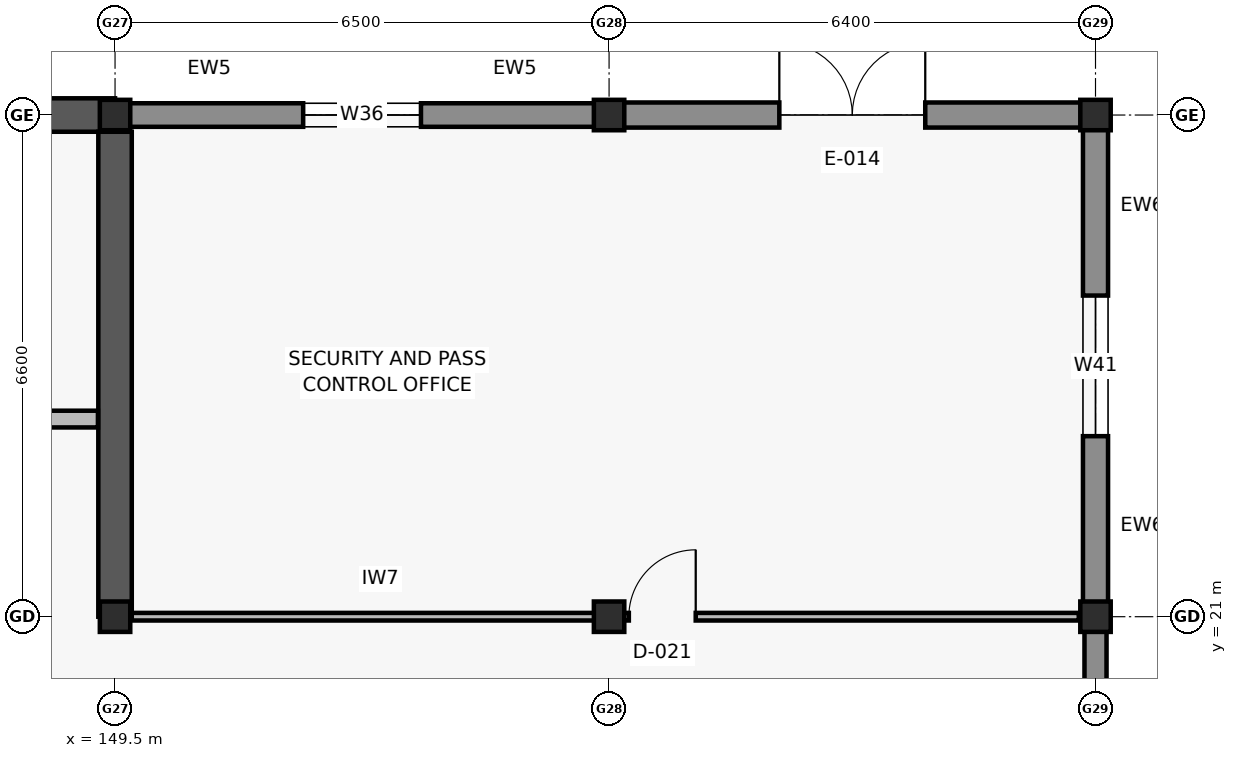
"""IFC4 building model, lengths in metres.
Left out: names, types, materials, properties, quantities, classifications, styles, units other than length and angle.
Written with IfcOpenShell. Run it as: python <this file> out.ifc"""

import sys

from ifc_helpers import new_model, si_unit, direction, frame, frame_2d, origin, origin_2d, place, context, subcontext, project, spatial, rectangle, i_section, extrude, element, fill, save


model = new_model("IFC4")
c1 = context("Model", 3, precision=1e-05, world=origin(), true_north=direction((0.0, 1.0)))
c2 = subcontext(c1, "Body", "Model", "MODEL_VIEW")
j1 = project(units=[si_unit("LENGTHUNIT", "METRE"), si_unit("PLANEANGLEUNIT", "RADIAN")], contexts=[c1])
p1 = place(None, origin())
s1 = spatial("IfcSite", under=j1, at=p1, CompositionType="ELEMENT")
p2 = place(p1, origin())
s2 = spatial("IfcBuilding", under=s1, at=p2, CompositionType="ELEMENT")
p3 = place(p2, origin())
s3 = spatial("IfcBuildingStorey", under=s2, at=p3, CompositionType="ELEMENT", Elevation=0.0)
for number, where, z_axis, x_axis in (
    (1, (149.5, 21.0, 0.0), (0.0, 0.0, 1.0), (1.0, 0.0, 0.0)),
    (2, (149.5, 27.6, 0.0), (0.0, 0.0, 1.0), (1.0, 0.0, 0.0)),
    (3, (156.0, 21.0, 0.0), (0.0, 0.0, 1.0), (1.0, 0.0, 0.0)),
    (4, (156.0, 27.6, 0.0), (0.0, 0.0, 1.0), (1.0, 0.0, 0.0)),
    (5, (162.4, 21.0, 0.0), (0.0, 0.0, 1.0), (1.0, 0.0, 0.0)),
    (6, (162.4, 27.6, 0.0), (0.0, 0.0, 1.0), (1.0, 0.0, 0.0)),
):
    element("IfcColumn", number, at=place(p3, frame(where, z_axis=z_axis, x_axis=x_axis)), inside=s3, PredefinedType="COLUMN", context=c2, shape_type="SweptSolid", body=[
        extrude(i_section(OverallWidth=0.4, OverallDepth=0.4, WebThickness=0.02, FlangeThickness=0.032, at=origin_2d()), origin(), (0.0, 0.0, 1.0), 5.4),
    ])
p4 = place(p3, frame((143.0, 27.6, 0.0), z_axis=(0.0, 0.0, 1.0), x_axis=(1.0, 0.0, 0.0)))
e7 = element("IfcWall", 7, at=p4, inside=s3, PredefinedType="SHEAR", context=c2, shape_type="SweptSolid", body=[
    extrude(rectangle(XDim=6.5, YDim=0.44, at=frame_2d((3.25, 0.0))), origin(), (0.0, 0.0, 1.0), 5.16),
])
p5 = place(p4, frame((1.48, 0.0, 0.0)))
e8 = element("IfcOpeningElement", 8, at=p5, cuts=e7, PredefinedType="OPENING", context=c2, shape_type="SweptSolid", body=[
    extrude(rectangle(XDim=1.06, YDim=2.12, at=frame_2d((0.53, 1.06))), frame((0.0, 0.23, 0.0), z_axis=(0.0, -1.0, 0.0), x_axis=(1.0, 0.0, 0.0)), (0.0, 0.0, 1.0), 0.46),
])
p6 = place(p3, frame((149.5, 21.0, 0.0), z_axis=(0.0, 0.0, 1.0), x_axis=(0.0, 1.0, 0.0)))
e9 = element("IfcWall", 9, at=p6, inside=s3, PredefinedType="SHEAR", context=c2, shape_type="SweptSolid", body=[
    extrude(rectangle(XDim=6.38, YDim=0.44, at=frame_2d((3.19, 0.0))), origin(), (0.0, 0.0, 1.0), 5.16),
])
p7 = place(p3, frame((149.505, 27.6, 0.0), z_axis=(0.0, 0.0, 1.0), x_axis=(1.0, 0.0, 0.0)))
e10 = element("IfcWall", 10, at=p7, inside=s3, PredefinedType="SOLIDWALL", context=c2, shape_type="SweptSolid", body=[
    extrude(rectangle(XDim=6.49, YDim=0.31, at=frame_2d((3.245, 0.0))), origin(), (0.0, 0.0, 1.0), 4.52),
])
p8 = place(p7, frame((2.47, 0.0, 0.8)))
e11 = element("IfcOpeningElement", 11, at=p8, cuts=e10, PredefinedType="OPENING", context=c2, shape_type="SweptSolid", body=[
    extrude(rectangle(XDim=1.55, YDim=1.5, at=frame_2d((0.775, 0.75))), frame((0.0, 0.165, 0.0), z_axis=(0.0, -1.0, 0.0), x_axis=(1.0, 0.0, 0.0)), (0.0, 0.0, 1.0), 0.33),
])
p9 = place(p3, frame((156.005, 27.6, 0.0), z_axis=(0.0, 0.0, 1.0), x_axis=(1.0, 0.0, 0.0)))
e12 = element("IfcWall", 12, at=p9, inside=s3, PredefinedType="SOLIDWALL", context=c2, shape_type="SweptSolid", body=[
    extrude(rectangle(XDim=6.39, YDim=0.33, at=frame_2d((3.195, 0.0))), origin(), (0.0, 0.0, 1.0), 4.52),
])
p10 = place(p9, frame((2.235, 0.0, 0.0)))
e13 = element("IfcOpeningElement", 13, at=p10, cuts=e12, PredefinedType="OPENING", context=c2, shape_type="SweptSolid", body=[
    extrude(rectangle(XDim=1.92, YDim=2.25, at=frame_2d((0.96, 1.125))), frame((0.0, 0.175, 0.0), z_axis=(0.0, -1.0, 0.0), x_axis=(1.0, 0.0, 0.0)), (0.0, 0.0, 1.0), 0.35),
])
p11 = place(p3, frame((162.4, 20.995, 0.0), z_axis=(0.0, 0.0, 1.0), x_axis=(0.0, -1.0, 0.0)))
e14 = element("IfcWall", 14, at=p11, inside=s3, PredefinedType="SOLIDWALL", context=c2, shape_type="SweptSolid", body=[
    extrude(rectangle(XDim=6.59, YDim=0.29, at=frame_2d((3.295, 0.0))), origin(), (0.0, 0.0, 1.0), 4.52),
])
p12 = place(p11, frame((3.978, 0.0, 0.8)))
e15 = element("IfcOpeningElement", 15, at=p12, cuts=e14, PredefinedType="OPENING", context=c2, shape_type="SweptSolid", body=[
    extrude(rectangle(XDim=1.4, YDim=1.65, at=frame_2d((0.7, 0.825))), frame((0.0, 0.155, 0.0), z_axis=(0.0, -1.0, 0.0), x_axis=(1.0, 0.0, 0.0)), (0.0, 0.0, 1.0), 0.31),
])
p13 = place(p3, frame((162.4, 27.595, 0.0), z_axis=(0.0, 0.0, 1.0), x_axis=(0.0, -1.0, 0.0)))
e16 = element("IfcWall", 16, at=p13, inside=s3, PredefinedType="SOLIDWALL", context=c2, shape_type="SweptSolid", body=[
    extrude(rectangle(XDim=6.59, YDim=0.33, at=frame_2d((3.295, 0.0))), origin(), (0.0, 0.0, 1.0), 4.52),
])
p14 = place(p13, frame((2.37, 0.0, 0.8)))
e17 = element("IfcOpeningElement", 17, at=p14, cuts=e16, PredefinedType="OPENING", context=c2, shape_type="SweptSolid", body=[
    extrude(rectangle(XDim=1.85, YDim=1.55, at=frame_2d((0.925, 0.775))), frame((0.0, 0.175, 0.0), z_axis=(0.0, -1.0, 0.0), x_axis=(1.0, 0.0, 0.0)), (0.0, 0.0, 1.0), 0.35),
])
p15 = place(p3, frame((146.24, 23.6, 0.0), z_axis=(0.0, 0.0, 1.0), x_axis=(1.0, 0.0, 0.0)))
e18 = element("IfcWall", 18, at=p15, inside=s3, PredefinedType="SOLIDWALL", context=c2, shape_type="SweptSolid", body=[
    extrude(rectangle(XDim=3.035, YDim=0.22, at=frame_2d((1.518, 0.0))), origin(), (0.0, 0.0, 1.0), 5.16),
])
p16 = place(p15, frame((0.968, 0.0, 0.0)))
e19 = element("IfcOpeningElement", 19, at=p16, cuts=e18, PredefinedType="OPENING", context=c2, shape_type="SweptSolid", body=[
    extrude(rectangle(XDim=1.1, YDim=2.1, at=frame_2d((0.55, 1.05))), frame((0.0, 0.12, 0.0), z_axis=(0.0, -1.0, 0.0), x_axis=(1.0, 0.0, 0.0)), (0.0, 0.0, 1.0), 0.24),
])
p17 = place(p3, frame((149.72, 21.0, 0.0), z_axis=(0.0, 0.0, 1.0), x_axis=(1.0, 0.0, 0.0)))
e20 = element("IfcWall", 20, at=p17, inside=s3, PredefinedType="PARTITIONING", context=c2, shape_type="SweptSolid", body=[
    extrude(rectangle(XDim=12.46, YDim=0.1, at=frame_2d((6.23, 0.0))), origin(), (0.0, 0.0, 1.0), 4.5),
])
p18 = place(p17, frame((6.54, 0.0, 0.0)))
e21 = element("IfcOpeningElement", 21, at=p18, cuts=e20, PredefinedType="OPENING", context=c2, shape_type="SweptSolid", body=[
    extrude(rectangle(XDim=0.88, YDim=2.04, at=frame_2d((0.44, 1.02))), frame((0.0, 0.06, 0.0), z_axis=(0.0, -1.0, 0.0), x_axis=(1.0, 0.0, 0.0)), (0.0, 0.0, 1.0), 0.12),
])
p19 = place(p8, origin())
e22 = element("IfcWindow", 22, at=p19, inside=s3, PartitioningType="SINGLE_PANEL", PredefinedType="WINDOW", context=c2, shape_type="SweptSolid", body=[
    extrude(rectangle(XDim=1.55, YDim=1.5, at=frame_2d((0.775, 0.75))), frame((0.0, 0.03, 0.0), z_axis=(0.0, -1.0, 0.0), x_axis=(1.0, 0.0, 0.0)), (0.0, 0.0, 1.0), 0.06),
])
fill(e11, e22)
p20 = place(p10, origin())
e23 = element("IfcDoor", 23, at=p20, inside=s3, OperationType="DOUBLE_DOOR_SINGLE_SWING", PredefinedType="DOOR", context=c2, shape_type="SweptSolid", body=[
    extrude(rectangle(XDim=1.92, YDim=2.25, at=frame_2d((0.96, 1.125))), frame((0.0, 0.025, 0.0), z_axis=(0.0, -1.0, 0.0), x_axis=(1.0, 0.0, 0.0)), (0.0, 0.0, 1.0), 0.05),
])
fill(e13, e23)
p21 = place(p14, origin())
e24 = element("IfcWindow", 24, at=p21, inside=s3, PartitioningType="DOUBLE_PANEL_VERTICAL", PredefinedType="WINDOW", context=c2, shape_type="SweptSolid", body=[
    extrude(rectangle(XDim=1.85, YDim=1.55, at=frame_2d((0.925, 0.775))), frame((0.0, 0.03, 0.0), z_axis=(0.0, -1.0, 0.0), x_axis=(1.0, 0.0, 0.0)), (0.0, 0.0, 1.0), 0.06),
])
fill(e17, e24)
p22 = place(p18, origin())
e25 = element("IfcDoor", 25, at=p22, inside=s3, OperationType="SINGLE_SWING_RIGHT", PredefinedType="DOOR", context=c2, shape_type="SweptSolid", body=[
    extrude(rectangle(XDim=0.88, YDim=2.04, at=frame_2d((0.44, 1.02))), frame((0.0, 0.025, 0.0), z_axis=(0.0, -1.0, 0.0), x_axis=(1.0, 0.0, 0.0)), (0.0, 0.0, 1.0), 0.05),
])
fill(e21, e25)
save(model, sys.argv[1])
